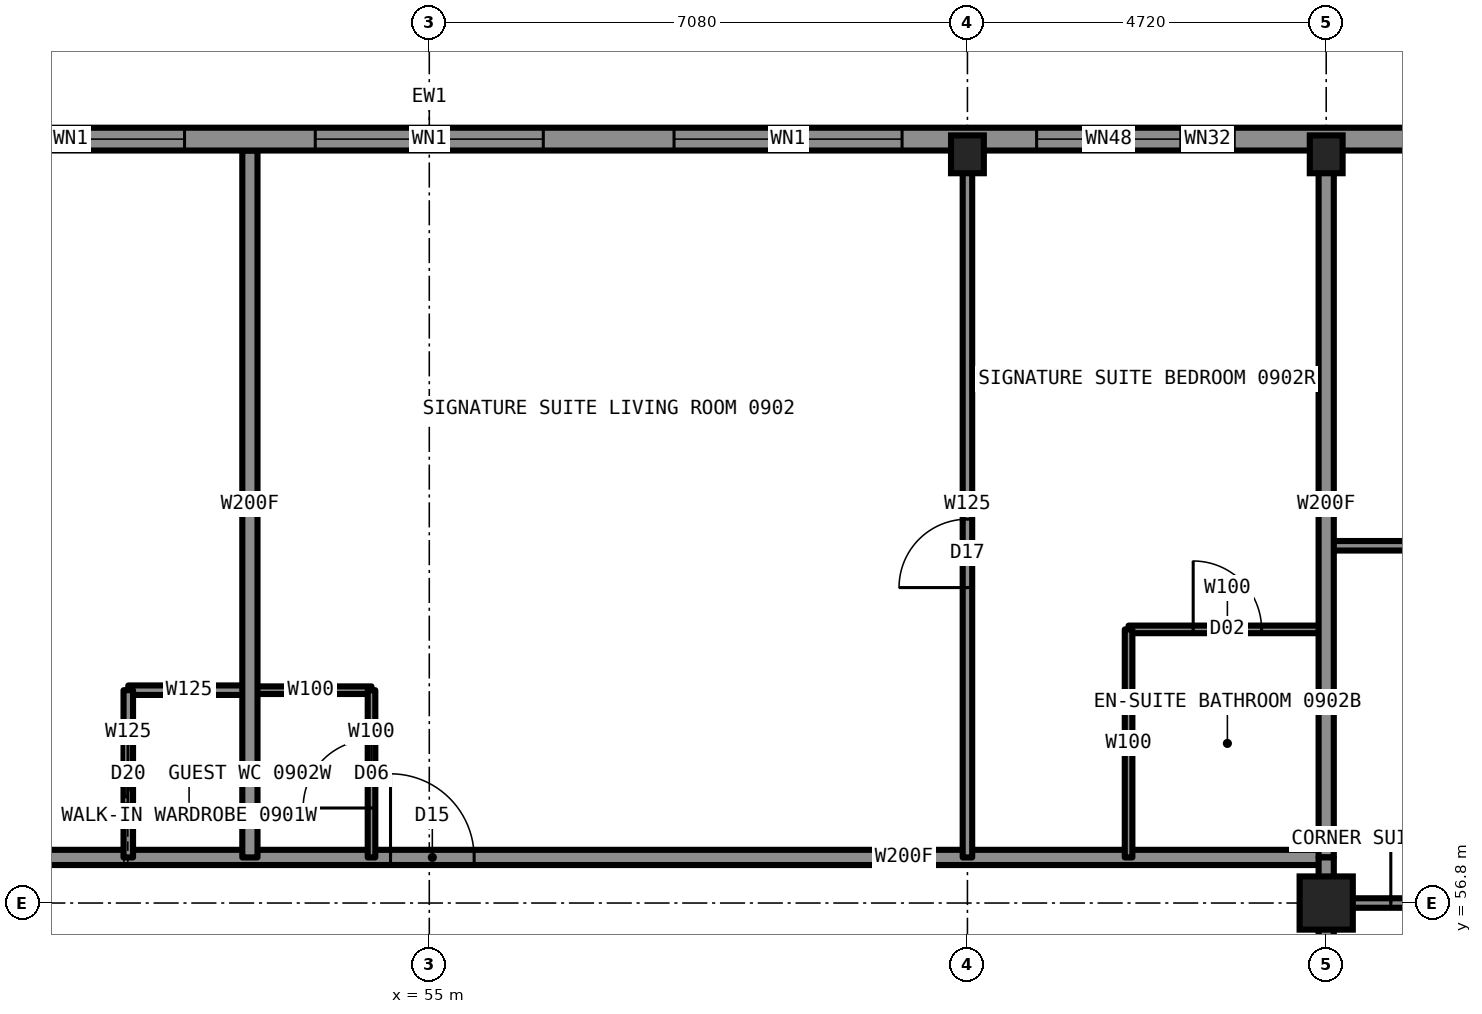
"""IFC4 building model, lengths in metres.
Left out: names, types, materials, properties, quantities, classifications, styles, units other than length and angle.
Written with IfcOpenShell. Run it as: python <this file> out.ifc"""

import sys

from ifc_helpers import new_model, si_unit, direction, frame, frame_2d, origin, origin_2d, place, context, subcontext, project, spatial, rectangle, hollow_rectangle, i_section, extrude, element, fill, save


model = new_model("IFC4")
c1 = context("Model", 3, precision=1e-05, world=origin(), true_north=direction((0.0, 1.0)))
c2 = subcontext(c1, "Body", "Model", "MODEL_VIEW")
j1 = project(units=[si_unit("LENGTHUNIT", "METRE"), si_unit("PLANEANGLEUNIT", "RADIAN")], contexts=[c1])
p1 = place(None, origin())
s1 = spatial("IfcSite", under=j1, at=p1, CompositionType="ELEMENT")
p2 = place(p1, origin())
s2 = spatial("IfcBuilding", under=s1, at=p2, CompositionType="ELEMENT")
p3 = place(p2, frame((0.0, 0.0, 39.0)))
s3 = spatial("IfcBuildingStorey", under=s2, at=p3, CompositionType="ELEMENT", Elevation=39.0)
for number, where, z_axis, x_axis in (
    (1, (62.08, 66.65, 0.0), (0.0, 0.0, 1.0), (1.0, 0.0, 0.0)),
    (2, (66.8, 66.65, 0.0), (0.0, 0.0, 1.0), (1.0, 0.0, 0.0)),
):
    element("IfcColumn", number, at=place(p3, frame(where, z_axis=z_axis, x_axis=x_axis)), inside=s3, PredefinedType="COLUMN", context=c2, shape_type="SweptSolid", body=[
        extrude(i_section(OverallWidth=0.432, OverallDepth=0.498, WebThickness=0.056, FlangeThickness=0.089, at=origin_2d()), origin(), (0.0, 0.0, 1.0), 3.5),
    ])
p4 = place(p3, frame((66.8, 56.8, 0.0), z_axis=(0.0, 0.0, 1.0), x_axis=(1.0, 0.0, 0.0)))
e3 = element("IfcColumn", 3, at=p4, inside=s3, PredefinedType="COLUMN", context=c2, shape_type="SweptSolid", body=[
    extrude(hollow_rectangle(XDim=0.7, YDim=0.7, WallThickness=0.06, at=origin_2d()), origin(), (0.0, 0.0, 1.0), 3.5),
])
p5 = place(p3, frame((66.8, 56.8, 0.0), z_axis=(0.0, 0.0, 1.0), x_axis=(1.0, 0.0, 0.0)))
e4 = element("IfcWall", 4, at=p5, inside=s3, PredefinedType="PARTITIONING", context=c2, shape_type="SweptSolid", body=[
    extrude(rectangle(XDim=9.9, YDim=0.125, at=frame_2d((4.95, 0.0))), origin(), (0.0, 0.0, 1.0), 2.573),
])
p6 = place(p5, frame((0.85, 0.0, 0.0)))
e5 = element("IfcOpeningElement", 5, at=p6, cuts=e4, PredefinedType="OPENING", context=c2, shape_type="SweptSolid", body=[
    extrude(rectangle(XDim=0.9, YDim=2.2, at=frame_2d((0.45, 1.1))), frame((0.0, 0.073, 0.0), z_axis=(0.0, -1.0, 0.0), x_axis=(1.0, 0.0, 0.0)), (0.0, 0.0, 1.0), 0.145),
])
p7 = place(p3, frame((43.2, 57.4, 0.0), z_axis=(0.0, 0.0, 1.0), x_axis=(1.0, 0.0, 0.0)))
e6 = element("IfcWall", 6, at=p7, inside=s3, PredefinedType="PARTITIONING", context=c2, shape_type="SweptSolid", body=[
    extrude(rectangle(XDim=23.6, YDim=0.2, at=frame_2d((11.8, 0.0))), origin(), (0.0, 0.0, 1.0), 3.33),
])
p8 = place(p7, frame((3.0, 0.0, 0.0)))
e7 = element("IfcOpeningElement", 7, at=p8, cuts=e6, PredefinedType="OPENING", context=c2, shape_type="SweptSolid", body=[
    extrude(rectangle(XDim=1.0, YDim=2.2, at=frame_2d((0.5, 1.1))), frame((0.0, 0.11, 0.0), z_axis=(0.0, -1.0, 0.0), x_axis=(1.0, 0.0, 0.0)), (0.0, 0.0, 1.0), 0.22),
])
p9 = place(p7, frame((11.29, 0.0, 0.0)))
e8 = element("IfcOpeningElement", 8, at=p9, cuts=e6, PredefinedType="OPENING", context=c2, shape_type="SweptSolid", body=[
    extrude(rectangle(XDim=1.1, YDim=2.2, at=frame_2d((0.55, 1.1))), frame((0.0, 0.11, 0.0), z_axis=(0.0, -1.0, 0.0), x_axis=(1.0, 0.0, 0.0)), (0.0, 0.0, 1.0), 0.22),
])
p10 = place(p3, frame((52.64, 59.6, 0.0), z_axis=(0.0, 0.0, 1.0), x_axis=(1.0, 0.0, 0.0)))
e9 = element("IfcWall", 9, at=p10, inside=s3, PredefinedType="PARTITIONING", context=c2, shape_type="SweptSolid", body=[
    extrude(rectangle(XDim=1.6, YDim=0.1, at=frame_2d((0.8, 0.0))), origin(), (0.0, 0.0, 1.0), 3.33),
])
p11 = place(p3, frame((51.04, 59.6, 0.0), z_axis=(0.0, 0.0, 1.0), x_axis=(1.0, 0.0, 0.0)))
e10 = element("IfcWall", 10, at=p11, inside=s3, PredefinedType="PARTITIONING", context=c2, shape_type="SweptSolid", body=[
    extrude(rectangle(XDim=1.6, YDim=0.125, at=frame_2d((0.8, 0.0))), origin(), (0.0, 0.0, 1.0), 3.33),
])
p12 = place(p3, frame((64.2, 60.4, 0.0), z_axis=(0.0, 0.0, 1.0), x_axis=(1.0, 0.0, 0.0)))
e11 = element("IfcWall", 11, at=p12, inside=s3, PredefinedType="PARTITIONING", context=c2, shape_type="SweptSolid", body=[
    extrude(rectangle(XDim=2.6, YDim=0.1, at=frame_2d((1.3, 0.0))), origin(), (0.0, 0.0, 1.0), 3.33),
])
p13 = place(p12, frame((0.85, 0.0, 0.0)))
e12 = element("IfcOpeningElement", 12, at=p13, cuts=e11, PredefinedType="OPENING", context=c2, shape_type="SweptSolid", body=[
    extrude(rectangle(XDim=0.9, YDim=2.1, at=frame_2d((0.45, 1.05))), frame((0.0, 0.06, 0.0), z_axis=(0.0, -1.0, 0.0), x_axis=(1.0, 0.0, 0.0)), (0.0, 0.0, 1.0), 0.12),
])
p14 = place(p3, frame((66.8, 61.5, 0.0), z_axis=(0.0, 0.0, 1.0), x_axis=(1.0, 0.0, 0.0)))
e13 = element("IfcWall", 13, at=p14, inside=s3, PredefinedType="PARTITIONING", context=c2, shape_type="SweptSolid", body=[
    extrude(rectangle(XDim=9.894, YDim=0.125, at=frame_2d((4.947, 0.0))), origin(), (0.0, 0.0, 1.0), 3.33),
])
p15 = place(p14, frame((1.75, 0.0, 0.0)))
e14 = element("IfcOpeningElement", 14, at=p15, cuts=e13, PredefinedType="OPENING", context=c2, shape_type="SweptSolid", body=[
    extrude(rectangle(XDim=0.9, YDim=2.2, at=frame_2d((0.45, 1.1))), frame((0.0, 0.073, 0.0), z_axis=(0.0, -1.0, 0.0), x_axis=(1.0, 0.0, 0.0)), (0.0, 0.0, 1.0), 0.145),
])
p16 = place(p3, frame((54.24, 57.4, 0.0), z_axis=(0.0, 0.0, 1.0), x_axis=(0.0, 1.0, 0.0)))
e15 = element("IfcWall", 15, at=p16, inside=s3, PredefinedType="PARTITIONING", context=c2, shape_type="SweptSolid", body=[
    extrude(rectangle(XDim=2.2, YDim=0.1, at=frame_2d((1.1, 0.0))), origin(), (0.0, 0.0, 1.0), 3.33),
])
p17 = place(p16, frame((0.65, 0.0, 0.0)))
e16 = element("IfcOpeningElement", 16, at=p17, cuts=e15, PredefinedType="OPENING", context=c2, shape_type="SweptSolid", body=[
    extrude(rectangle(XDim=0.9, YDim=2.1, at=frame_2d((0.45, 1.05))), frame((0.0, 0.06, 0.0), z_axis=(0.0, -1.0, 0.0), x_axis=(1.0, 0.0, 0.0)), (0.0, 0.0, 1.0), 0.12),
])
p18 = place(p3, frame((52.64, 57.4, 0.0), z_axis=(0.0, 0.0, 1.0), x_axis=(0.0, 1.0, 0.0)))
e17 = element("IfcWall", 17, at=p18, inside=s3, PredefinedType="PARTITIONING", context=c2, shape_type="SweptSolid", body=[
    extrude(rectangle(XDim=9.3, YDim=0.2, at=frame_2d((4.65, 0.0))), origin(), (0.0, 0.0, 1.0), 3.33),
])
p19 = place(p3, frame((51.04, 57.4, 0.0), z_axis=(0.0, 0.0, 1.0), x_axis=(0.0, 1.0, 0.0)))
e18 = element("IfcWall", 18, at=p19, inside=s3, PredefinedType="PARTITIONING", context=c2, shape_type="SweptSolid", body=[
    extrude(rectangle(XDim=2.2, YDim=0.125, at=frame_2d((1.1, 0.0))), origin(), (0.0, 0.0, 1.0), 3.33),
])
p20 = place(p19, frame((0.7, 0.0, 0.0)))
e19 = element("IfcOpeningElement", 19, at=p20, cuts=e18, PredefinedType="OPENING", context=c2, shape_type="SweptSolid", body=[
    extrude(rectangle(XDim=0.8, YDim=2.1, at=frame_2d((0.4, 1.05))), frame((0.0, 0.073, 0.0), z_axis=(0.0, -1.0, 0.0), x_axis=(1.0, 0.0, 0.0)), (0.0, 0.0, 1.0), 0.145),
])
p21 = place(p3, frame((66.8, 33.2, 0.0), z_axis=(0.0, 0.0, 1.0), x_axis=(0.0, 1.0, 0.0)))
e20 = element("IfcWall", 20, at=p21, inside=s3, PredefinedType="PARTITIONING", context=c2, shape_type="SweptSolid", body=[
    extrude(rectangle(XDim=23.58, YDim=0.2, at=frame_2d((11.79, 0.0))), origin(), (0.0, 0.0, 1.0), 3.33),
])
p22 = place(p21, frame((7.72, 0.0, 0.0)))
e21 = element("IfcOpeningElement", 21, at=p22, cuts=e20, PredefinedType="OPENING", context=c2, shape_type="SweptSolid", body=[
    extrude(rectangle(XDim=1.0, YDim=2.2, at=frame_2d((0.5, 1.1))), frame((0.0, 0.11, 0.0), z_axis=(0.0, -1.0, 0.0), x_axis=(1.0, 0.0, 0.0)), (0.0, 0.0, 1.0), 0.22),
])
p23 = place(p21, frame((17.31, 0.0, 0.0)))
e22 = element("IfcOpeningElement", 22, at=p23, cuts=e20, PredefinedType="OPENING", context=c2, shape_type="SweptSolid", body=[
    extrude(rectangle(XDim=1.0, YDim=2.2, at=frame_2d((0.5, 1.1))), frame((0.0, 0.11, 0.0), z_axis=(0.0, -1.0, 0.0), x_axis=(1.0, 0.0, 0.0)), (0.0, 0.0, 1.0), 0.22),
])
p24 = place(p21, frame((21.84, 0.0, 0.0)))
e23 = element("IfcOpeningElement", 23, at=p24, cuts=e20, PredefinedType="OPENING", context=c2, shape_type="SweptSolid", body=[
    extrude(rectangle(XDim=1.1, YDim=2.2, at=frame_2d((0.55, 1.1))), frame((0.0, 0.11, 0.0), z_axis=(0.0, -1.0, 0.0), x_axis=(1.0, 0.0, 0.0)), (0.0, 0.0, 1.0), 0.22),
])
p25 = place(p21, frame((0.66, 0.0, 0.0)))
e24 = element("IfcOpeningElement", 24, at=p25, cuts=e20, PredefinedType="OPENING", context=c2, shape_type="SweptSolid", body=[
    extrude(rectangle(XDim=1.1, YDim=2.2, at=frame_2d((0.55, 1.1))), frame((0.0, 0.11, 0.0), z_axis=(0.0, -1.0, 0.0), x_axis=(1.0, 0.0, 0.0)), (0.0, 0.0, 1.0), 0.22),
])
p26 = place(p3, frame((66.8, 57.4, 0.0), z_axis=(0.0, 0.0, 1.0), x_axis=(0.0, 1.0, 0.0)))
e25 = element("IfcWall", 25, at=p26, inside=s3, PredefinedType="PARTITIONING", context=c2, shape_type="SweptSolid", body=[
    extrude(rectangle(XDim=9.3, YDim=0.2, at=frame_2d((4.65, 0.0))), origin(), (0.0, 0.0, 1.0), 2.573),
])
p27 = place(p3, frame((62.08, 57.4, 0.0), z_axis=(0.0, 0.0, 1.0), x_axis=(0.0, 1.0, 0.0)))
e26 = element("IfcWall", 26, at=p27, inside=s3, PredefinedType="PARTITIONING", context=c2, shape_type="SweptSolid", body=[
    extrude(rectangle(XDim=9.3, YDim=0.125, at=frame_2d((4.65, 0.0))), origin(), (0.0, 0.0, 1.0), 2.573),
])
p28 = place(p27, frame((3.55, 0.0, 0.0)))
e27 = element("IfcOpeningElement", 27, at=p28, cuts=e26, PredefinedType="OPENING", context=c2, shape_type="SweptSolid", body=[
    extrude(rectangle(XDim=0.9, YDim=2.2, at=frame_2d((0.45, 1.1))), frame((0.0, 0.073, 0.0), z_axis=(0.0, -1.0, 0.0), x_axis=(1.0, 0.0, 0.0)), (0.0, 0.0, 1.0), 0.145),
])
p29 = place(p3, frame((64.2, 57.4, 0.0), z_axis=(0.0, 0.0, 1.0), x_axis=(0.0, 1.0, 0.0)))
e28 = element("IfcWall", 28, at=p29, inside=s3, PredefinedType="PARTITIONING", context=c2, shape_type="SweptSolid", body=[
    extrude(rectangle(XDim=3.0, YDim=0.1, at=frame_2d((1.5, 0.0))), origin(), (0.0, 0.0, 1.0), 3.33),
])
p30 = place(p3, frame((71.5, 66.85, 0.0), z_axis=(0.0, 0.0, 1.0), x_axis=(-1.0, 0.0, 0.0)))
e29 = element("IfcWall", 29, at=p30, inside=s3, PredefinedType="SOLIDWALL", context=c2, shape_type="SweptSolid", body=[
    extrude(rectangle(XDim=33.0, YDim=0.3, at=frame_2d((16.5, 0.0))), origin(), (0.0, 0.0, 1.0), 2.83),
])
p31 = place(p30, frame((0.85, 0.0, 0.5)))
e30 = element("IfcOpeningElement", 30, at=p31, cuts=e29, PredefinedType="OPENING", context=c2, shape_type="SweptSolid", body=[
    extrude(rectangle(XDim=2.5, YDim=2.0, at=frame_2d((1.25, 1.0))), frame((0.0, 0.16, 0.0), z_axis=(0.0, -1.0, 0.0), x_axis=(1.0, 0.0, 0.0)), (0.0, 0.0, 1.0), 0.32),
])
p32 = place(p30, frame((6.61, 0.0, 0.5)))
e31 = element("IfcOpeningElement", 31, at=p32, cuts=e29, PredefinedType="OPENING", context=c2, shape_type="SweptSolid", body=[
    extrude(rectangle(XDim=1.9, YDim=1.9, at=frame_2d((0.95, 0.95))), frame((0.0, 0.16, 0.0), z_axis=(0.0, -1.0, 0.0), x_axis=(1.0, 0.0, 0.0)), (0.0, 0.0, 1.0), 0.32),
])
p33 = place(p30, frame((10.28, 0.0, 0.5)))
e32 = element("IfcOpeningElement", 32, at=p33, cuts=e29, PredefinedType="OPENING", context=c2, shape_type="SweptSolid", body=[
    extrude(rectangle(XDim=3.0, YDim=2.0, at=frame_2d((1.5, 1.0))), frame((0.0, 0.16, 0.0), z_axis=(0.0, -1.0, 0.0), x_axis=(1.0, 0.0, 0.0)), (0.0, 0.0, 1.0), 0.32),
])
p34 = place(p30, frame((15.0, 0.0, 0.5)))
e33 = element("IfcOpeningElement", 33, at=p34, cuts=e29, PredefinedType="OPENING", context=c2, shape_type="SweptSolid", body=[
    extrude(rectangle(XDim=3.0, YDim=2.0, at=frame_2d((1.5, 1.0))), frame((0.0, 0.16, 0.0), z_axis=(0.0, -1.0, 0.0), x_axis=(1.0, 0.0, 0.0)), (0.0, 0.0, 1.0), 0.32),
])
p35 = place(p30, frame((19.72, 0.0, 0.5)))
e34 = element("IfcOpeningElement", 34, at=p35, cuts=e29, PredefinedType="OPENING", context=c2, shape_type="SweptSolid", body=[
    extrude(rectangle(XDim=3.0, YDim=2.0, at=frame_2d((1.5, 1.0))), frame((0.0, 0.16, 0.0), z_axis=(0.0, -1.0, 0.0), x_axis=(1.0, 0.0, 0.0)), (0.0, 0.0, 1.0), 0.32),
])
p36 = place(p30, frame((24.44, 0.0, 0.5)))
e35 = element("IfcOpeningElement", 35, at=p36, cuts=e29, PredefinedType="OPENING", context=c2, shape_type="SweptSolid", body=[
    extrude(rectangle(XDim=1.9, YDim=1.9, at=frame_2d((0.95, 0.95))), frame((0.0, 0.16, 0.0), z_axis=(0.0, -1.0, 0.0), x_axis=(1.0, 0.0, 0.0)), (0.0, 0.0, 1.0), 0.32),
])
p37 = place(p30, frame((29.6, 0.0, 0.5)))
e36 = element("IfcOpeningElement", 36, at=p37, cuts=e29, PredefinedType="OPENING", context=c2, shape_type="SweptSolid", body=[
    extrude(rectangle(XDim=2.5, YDim=2.0, at=frame_2d((1.25, 1.0))), frame((0.0, 0.16, 0.0), z_axis=(0.0, -1.0, 0.0), x_axis=(1.0, 0.0, 0.0)), (0.0, 0.0, 1.0), 0.32),
])
p38 = place(p30, frame((5.91, 0.0, 0.5)))
e37 = element("IfcOpeningElement", 37, at=p38, cuts=e29, PredefinedType="OPENING", context=c2, shape_type="SweptSolid", body=[
    extrude(rectangle(XDim=0.7, YDim=1.0, at=frame_2d((0.35, 0.5))), frame((0.0, 0.16, 0.0), z_axis=(0.0, -1.0, 0.0), x_axis=(1.0, 0.0, 0.0)), (0.0, 0.0, 1.0), 0.32),
])
p39 = place(p30, frame((26.39, 0.0, 0.5)))
e38 = element("IfcOpeningElement", 38, at=p39, cuts=e29, PredefinedType="OPENING", context=c2, shape_type="SweptSolid", body=[
    extrude(rectangle(XDim=0.7, YDim=1.0, at=frame_2d((0.35, 0.5))), frame((0.0, 0.16, 0.0), z_axis=(0.0, -1.0, 0.0), x_axis=(1.0, 0.0, 0.0)), (0.0, 0.0, 1.0), 0.32),
])
p40 = place(p3, frame((66.8, 56.78, 0.0), z_axis=(0.0, 0.0, 1.0), x_axis=(0.0, 1.0, 0.0)))
e39 = element("IfcWall", 39, at=p40, inside=s3, PredefinedType="PARTITIONING", context=c2, shape_type="SweptSolid", body=[
    extrude(rectangle(XDim=0.62, YDim=0.2, at=frame_2d((0.31, 0.0))), origin(), (0.0, 0.0, 1.0), 2.573),
])
p41 = place(p20, origin())
e40 = element("IfcDoor", 40, at=p41, inside=s3, OperationType="SLIDING_TO_LEFT", PredefinedType="DOOR", context=c2, shape_type="SweptSolid", body=[
    extrude(rectangle(XDim=0.8, YDim=2.1, at=frame_2d((0.4, 1.05))), frame((0.0, 0.025, 0.0), z_axis=(0.0, -1.0, 0.0), x_axis=(1.0, 0.0, 0.0)), (0.0, 0.0, 1.0), 0.05),
])
fill(e19, e40)
p42 = place(p9, origin())
e41 = element("IfcDoor", 41, at=p42, inside=s3, OperationType="SINGLE_SWING_LEFT", PredefinedType="DOOR", context=c2, shape_type="SweptSolid", body=[
    extrude(rectangle(XDim=1.1, YDim=2.2, at=frame_2d((0.55, 1.1))), frame((0.0, 0.025, 0.0), z_axis=(0.0, -1.0, 0.0), x_axis=(1.0, 0.0, 0.0)), (0.0, 0.0, 1.0), 0.05),
])
fill(e8, e41)
p43 = place(p13, origin())
e42 = element("IfcDoor", 42, at=p43, inside=s3, OperationType="SINGLE_SWING_RIGHT", PredefinedType="DOOR", context=c2, shape_type="SweptSolid", body=[
    extrude(rectangle(XDim=0.9, YDim=2.1, at=frame_2d((0.45, 1.05))), frame((0.0, 0.025, 0.0), z_axis=(0.0, -1.0, 0.0), x_axis=(1.0, 0.0, 0.0)), (0.0, 0.0, 1.0), 0.05),
])
fill(e12, e42)
p44 = place(p28, origin())
e43 = element("IfcDoor", 43, at=p44, inside=s3, OperationType="SINGLE_SWING_LEFT", PredefinedType="DOOR", context=c2, shape_type="SweptSolid", body=[
    extrude(rectangle(XDim=0.9, YDim=2.2, at=frame_2d((0.45, 1.1))), frame((0.0, 0.025, 0.0), z_axis=(0.0, -1.0, 0.0), x_axis=(1.0, 0.0, 0.0)), (0.0, 0.0, 1.0), 0.05),
])
fill(e27, e43)
p45 = place(p17, origin())
e44 = element("IfcDoor", 44, at=p45, inside=s3, OperationType="SINGLE_SWING_LEFT", PredefinedType="DOOR", context=c2, shape_type="SweptSolid", body=[
    extrude(rectangle(XDim=0.9, YDim=2.1, at=frame_2d((0.45, 1.05))), frame((0.0, 0.025, 0.0), z_axis=(0.0, -1.0, 0.0), x_axis=(1.0, 0.0, 0.0)), (0.0, 0.0, 1.0), 0.05),
])
fill(e16, e44)
p46 = place(p6, origin())
e45 = element("IfcDoor", 45, at=p46, inside=s3, OperationType="SINGLE_SWING_LEFT", PredefinedType="DOOR", context=c2, shape_type="SweptSolid", body=[
    extrude(rectangle(XDim=0.9, YDim=2.2, at=frame_2d((0.45, 1.1))), frame((0.0, 0.025, 0.0), z_axis=(0.0, -1.0, 0.0), x_axis=(1.0, 0.0, 0.0)), (0.0, 0.0, 1.0), 0.05),
])
fill(e5, e45)
p47 = place(p32, origin())
e46 = element("IfcWindow", 46, at=p47, inside=s3, PartitioningType="SINGLE_PANEL", PredefinedType="WINDOW", context=c2, shape_type="SweptSolid", body=[
    extrude(rectangle(XDim=1.9, YDim=1.9, at=frame_2d((0.95, 0.95))), frame((0.0, 0.03, 0.0), z_axis=(0.0, -1.0, 0.0), x_axis=(1.0, 0.0, 0.0)), (0.0, 0.0, 1.0), 0.06),
])
fill(e31, e46)
p48 = place(p33, origin())
e47 = element("IfcWindow", 47, at=p48, inside=s3, PartitioningType="SINGLE_PANEL", PredefinedType="WINDOW", context=c2, shape_type="SweptSolid", body=[
    extrude(rectangle(XDim=3.0, YDim=2.0, at=frame_2d((1.5, 1.0))), frame((0.0, 0.03, 0.0), z_axis=(0.0, -1.0, 0.0), x_axis=(1.0, 0.0, 0.0)), (0.0, 0.0, 1.0), 0.06),
])
fill(e32, e47)
p49 = place(p34, origin())
e48 = element("IfcWindow", 48, at=p49, inside=s3, PartitioningType="SINGLE_PANEL", PredefinedType="WINDOW", context=c2, shape_type="SweptSolid", body=[
    extrude(rectangle(XDim=3.0, YDim=2.0, at=frame_2d((1.5, 1.0))), frame((0.0, 0.03, 0.0), z_axis=(0.0, -1.0, 0.0), x_axis=(1.0, 0.0, 0.0)), (0.0, 0.0, 1.0), 0.06),
])
fill(e33, e48)
p50 = place(p35, origin())
e49 = element("IfcWindow", 49, at=p50, inside=s3, PartitioningType="SINGLE_PANEL", PredefinedType="WINDOW", context=c2, shape_type="SweptSolid", body=[
    extrude(rectangle(XDim=3.0, YDim=2.0, at=frame_2d((1.5, 1.0))), frame((0.0, 0.03, 0.0), z_axis=(0.0, -1.0, 0.0), x_axis=(1.0, 0.0, 0.0)), (0.0, 0.0, 1.0), 0.06),
])
fill(e34, e49)
p51 = place(p38, origin())
e50 = element("IfcWindow", 50, at=p51, inside=s3, PartitioningType="SINGLE_PANEL", PredefinedType="WINDOW", context=c2, shape_type="SweptSolid", body=[
    extrude(rectangle(XDim=0.7, YDim=1.0, at=frame_2d((0.35, 0.5))), frame((0.0, 0.03, 0.0), z_axis=(0.0, -1.0, 0.0), x_axis=(1.0, 0.0, 0.0)), (0.0, 0.0, 1.0), 0.06),
])
fill(e37, e50)
save(model, sys.argv[1])
